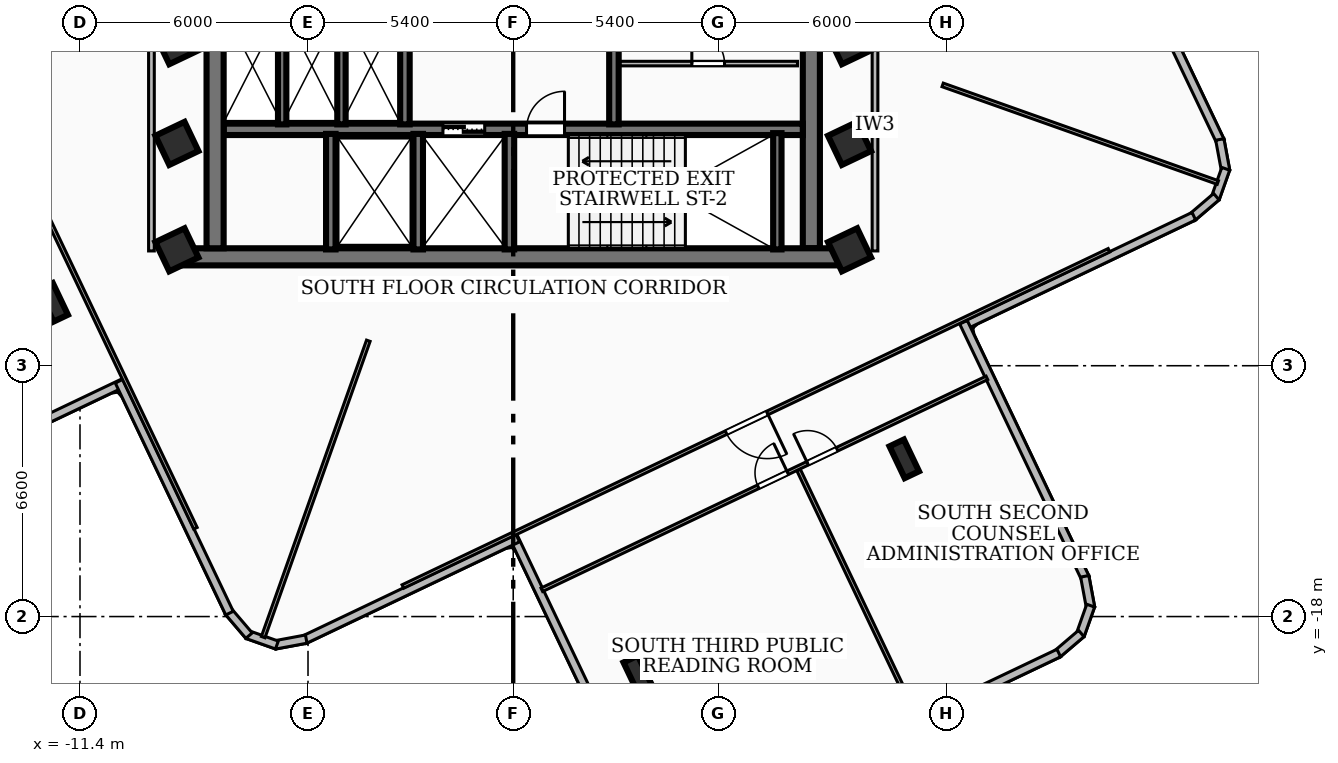
"""IFC4 building model, lengths in metres.
Left out: names, types, materials, properties, quantities, classifications, styles, units other than length and angle.
Written with IfcOpenShell. Run it as: python <this file> out.ifc"""

import sys

from ifc_helpers import new_model, si_unit, direction, frame, frame_2d, origin, origin_2d, place, context, subcontext, project, spatial, rectangle, i_section, extrude, element, fill, save


model = new_model("IFC4")
c1 = context("Model", 3, precision=1e-05, world=origin(), true_north=direction((0.0, 1.0)))
c2 = subcontext(c1, "Body", "Model", "MODEL_VIEW")
j1 = project(units=[si_unit("LENGTHUNIT", "METRE"), si_unit("PLANEANGLEUNIT", "RADIAN")], contexts=[c1])
p1 = place(None, origin())
s1 = spatial("IfcSite", under=j1, at=p1, CompositionType="ELEMENT")
p2 = place(p1, origin())
s2 = spatial("IfcBuilding", under=s1, at=p2, CompositionType="ELEMENT")
p3 = place(p2, frame((0.0, 0.0, 188.28)))
s3 = spatial("IfcBuildingStorey", under=s2, at=p3, CompositionType="ELEMENT", Elevation=188.28)
p4 = place(p3, frame((8.78, -8.535, 0.0), z_axis=(0.0, 0.0, 1.0), x_axis=(-1.0, 0.0, 0.0)))
e1 = element("IfcWall", 1, at=p4, inside=s3, PredefinedType="SHEAR", context=c2, shape_type="SweptSolid", body=[
    extrude(rectangle(XDim=17.56, YDim=0.45, at=frame_2d((8.78, 0.0))), origin(), (0.0, 0.0, 1.0), 4.06),
])
for number, where, z_axis, x_axis in (
    (2, (-7.845, -8.31, 0.0), (0.0, 0.0, 1.0), (0.0, 1.0, 0.0)),
    (3, (7.845, -1.975, 0.0), (0.0, 0.0, 1.0), (0.0, -1.0, 0.0)),
):
    element("IfcWall", number, at=place(p3, frame(where, z_axis=z_axis, x_axis=x_axis)), inside=s3, PredefinedType="SHEAR", context=c2, shape_type="SweptSolid", body=[
        extrude(rectangle(XDim=6.335, YDim=0.45, at=frame_2d((3.167, 0.0))), origin(), (0.0, 0.0, 1.0), 4.06),
    ])
p5 = place(p3, frame((-7.62, -5.18, 0.0), z_axis=(0.0, 0.0, 1.0), x_axis=(1.0, 0.0, 0.0)))
e4 = element("IfcWall", 4, at=p5, inside=s3, PredefinedType="SOLIDWALL", context=c2, shape_type="SweptSolid", body=[
    extrude(rectangle(XDim=15.24, YDim=0.3, at=frame_2d((7.62, 0.0))), origin(), (0.0, 0.0, 1.0), 4.06),
])
p6 = place(p5, frame((5.77, 0.0, 0.0)))
e5 = element("IfcOpeningElement", 5, at=p6, cuts=e4, PredefinedType="OPENING", context=c2, shape_type="SweptSolid", body=[
    extrude(rectangle(XDim=1.1, YDim=2.15, at=frame_2d((0.55, 1.075))), frame((0.0, 0.16, 0.0), z_axis=(0.0, -1.0, 0.0), x_axis=(1.0, 0.0, 0.0)), (0.0, 0.0, 1.0), 0.32),
])
p7 = place(p5, frame((7.97, 0.0, 0.0)))
e6 = element("IfcOpeningElement", 6, at=p7, cuts=e4, PredefinedType="OPENING", context=c2, shape_type="SweptSolid", body=[
    extrude(rectangle(XDim=1.0, YDim=2.1, at=frame_2d((0.5, 1.05))), frame((0.0, 0.16, 0.0), z_axis=(0.0, -1.0, 0.0), x_axis=(1.0, 0.0, 0.0)), (0.0, 0.0, 1.0), 0.32),
])
p8 = place(p3, frame((6.95, -8.34, 0.0), z_axis=(0.0, 0.0, 1.0), x_axis=(0.0, 1.0, 0.0)))
e7 = element("IfcWall", 7, at=p8, inside=s3, PredefinedType="SOLIDWALL", context=c2, shape_type="SweptSolid", body=[
    extrude(rectangle(XDim=3.06, YDim=0.22, at=frame_2d((1.53, 0.0))), origin(), (0.0, 0.0, 1.0), 4.06),
])
for number, where, z_axis, x_axis in (
    (8, (-0.1, -8.34, 0.0), (0.0, 0.0, 1.0), (0.0, 1.0, 0.0)),
    (9, (-2.5, -8.34, 0.0), (0.0, 0.0, 1.0), (0.0, 1.0, 0.0)),
    (10, (-4.8, -8.34, 0.0), (0.0, 0.0, 1.0), (0.0, 1.0, 0.0)),
):
    element("IfcWall", number, at=place(p3, frame(where, z_axis=z_axis, x_axis=x_axis)), inside=s3, PredefinedType="SOLIDWALL", context=c2, shape_type="SweptSolid", body=[
        extrude(rectangle(XDim=3.04, YDim=0.25, at=frame_2d((1.52, 0.0))), origin(), (0.0, 0.0, 1.0), 4.06),
    ])
for number, where, z_axis, x_axis in (
    (11, (-2.85, -5.05, 0.0), (0.0, 0.0, 1.0), (0.0, 1.0, 0.0)),
    (12, (2.65, -5.05, 0.0), (0.0, 0.0, 1.0), (0.0, 1.0, 0.0)),
):
    element("IfcWall", number, at=place(p3, frame(where, z_axis=z_axis, x_axis=x_axis)), inside=s3, PredefinedType="SOLIDWALL", context=c2, shape_type="SweptSolid", body=[
        extrude(rectangle(XDim=3.07, YDim=0.25, at=frame_2d((1.535, 0.0))), origin(), (0.0, 0.0, 1.0), 4.06),
    ])
for number, where, z_axis, x_axis in (
    (13, (-6.08, -5.05, 0.0), (0.0, 0.0, 1.0), (0.0, 1.0, 0.0)),
    (14, (-4.52, -5.05, 0.0), (0.0, 0.0, 1.0), (0.0, 1.0, 0.0)),
):
    element("IfcWall", number, at=place(p3, frame(where, z_axis=z_axis, x_axis=x_axis)), inside=s3, PredefinedType="SOLIDWALL", context=c2, shape_type="SweptSolid", body=[
        extrude(rectangle(XDim=3.07, YDim=0.22, at=frame_2d((1.535, 0.0))), origin(), (0.0, 0.0, 1.0), 4.06),
    ])
for number, where, z_axis, x_axis in (
    (15, (-8.85, -5.55, 0.0), (0.0, 0.0, 1.0), (0.903, 0.43, 0.0)),
    (16, (-8.85, -2.9, 0.0), (0.0, 0.0, 1.0), (0.903, 0.43, 0.0)),
    (17, (8.85, -5.55, 0.0), (0.0, 0.0, 1.0), (0.903, 0.43, 0.0)),
    (18, (8.85, -2.9, 0.0), (0.0, 0.0, 1.0), (0.903, 0.43, 0.0)),
    (19, (8.85, -8.35, 0.0), (0.0, 0.0, 1.0), (0.903, 0.43, 0.0)),
    (20, (-8.85, -8.35, 0.0), (0.0, 0.0, 1.0), (0.903, 0.43, 0.0)),
):
    element("IfcColumn", number, at=place(p3, frame(where, z_axis=z_axis, x_axis=x_axis)), inside=s3, PredefinedType="COLUMN", context=c2, shape_type="SweptSolid", body=[
        extrude(rectangle(XDim=0.85, YDim=0.85, at=origin_2d()), origin(), (0.0, 0.0, 1.0), 4.32),
    ])
for number, where, z_axis, x_axis in (
    (21, (-12.106, -9.731, 0.0), (0.0, 0.0, 1.0), (0.903, 0.43, 0.0)),
    (22, (3.29, -19.536, 0.0), (0.0, 0.0, 1.0), (0.903, 0.43, 0.0)),
    (23, (10.29, -13.85, 0.0), (0.0, 0.0, 1.0), (0.903, 0.43, 0.0)),
):
    element("IfcColumn", number, at=place(p3, frame(where, z_axis=z_axis, x_axis=x_axis)), inside=s3, PredefinedType="COLUMN", context=c2, shape_type="SweptSolid", body=[
        extrude(i_section(OverallWidth=0.418, OverallDepth=0.927, WebThickness=0.019, FlangeThickness=0.032, at=origin_2d()), origin(), (0.0, 0.0, 1.0), 4.32),
    ])
p9 = place(p3, frame((-10.255, -11.848, 0.0), z_axis=(0.0, 0.0, 1.0), x_axis=(-0.902833615009, -0.429990073851, 0.0)))
e24 = element("IfcWall", 24, at=p9, inside=s3, PredefinedType="SOLIDWALL", context=c2, shape_type="SweptSolid", body=[
    extrude(rectangle(XDim=9.058, YDim=0.22, at=frame_2d((4.529, 0.0))), origin(), (0.0, 0.0, 1.0), 4.06),
])
p10 = place(p9, frame((3.85, 0.0, 0.85)))
e25 = element("IfcOpeningElement", 25, at=p10, cuts=e24, PredefinedType="OPENING", context=c2, shape_type="SweptSolid", body=[
    extrude(rectangle(XDim=2.4, YDim=1.65, at=frame_2d((1.2, 0.825))), frame((0.0, 0.12, 0.0), z_axis=(0.0, -1.0, 0.0), x_axis=(1.0, 0.0, 0.0)), (0.0, 0.0, 1.0), 0.24),
])
p11 = place(p3, frame((15.935, 0.119, 0.0), z_axis=(0.0, 0.0, 1.0), x_axis=(0.429997588734, -0.902830035878, 0.0)))
e26 = element("IfcWall", 26, at=p11, inside=s3, PredefinedType="SOLIDWALL", context=c2, shape_type="SweptSolid", body=[
    extrude(rectangle(XDim=6.218, YDim=0.22, at=frame_2d((3.109, 0.0))), origin(), (0.0, 0.0, 1.0), 4.06),
])
p12 = place(p3, frame((18.593, -5.447, 0.0), z_axis=(0.0, 0.0, 1.0), x_axis=(0.183282428617, -0.983060298944, 0.0)))
e27 = element("IfcWall", 27, at=p12, inside=s3, PredefinedType="SOLIDWALL", context=c2, shape_type="SweptSolid", body=[
    extrude(rectangle(XDim=0.835, YDim=0.22, at=frame_2d((0.417, 0.0))), origin(), (0.0, 0.0, 1.0), 4.06),
])
p13 = place(p3, frame((18.749, -6.219, 0.0), z_axis=(0.0, 0.0, 1.0), x_axis=(-0.33403451258, -0.942560843875, 0.0)))
e28 = element("IfcWall", 28, at=p13, inside=s3, PredefinedType="SOLIDWALL", context=c2, shape_type="SweptSolid", body=[
    extrude(rectangle(XDim=0.82, YDim=0.22, at=frame_2d((0.41, 0.0))), origin(), (0.0, 0.0, 1.0), 4.06),
])
p14 = place(p3, frame((18.502, -6.952, 0.0), z_axis=(0.0, 0.0, 1.0), x_axis=(-0.76070207285, -0.649101191157, 0.0)))
e29 = element("IfcWall", 29, at=p14, inside=s3, PredefinedType="SOLIDWALL", context=c2, shape_type="SweptSolid", body=[
    extrude(rectangle(XDim=0.833, YDim=0.22, at=frame_2d((0.417, 0.0))), origin(), (0.0, 0.0, 1.0), 4.06),
])
p15 = place(p3, frame((17.91, -7.466, 0.0), z_axis=(0.0, 0.0, 1.0), x_axis=(-0.902871867899, -0.429909746524, 0.0)))
e30 = element("IfcWall", 30, at=p15, inside=s3, PredefinedType="SOLIDWALL", context=c2, shape_type="SweptSolid", body=[
    extrude(rectangle(XDim=6.76, YDim=0.22, at=frame_2d((3.38, 0.0))), origin(), (0.0, 0.0, 1.0), 4.06),
])
p16 = place(p3, frame((11.848, -10.255, 0.0), z_axis=(0.0, 0.0, 1.0), x_axis=(0.429966614546, -0.902844787533, 0.0)))
e31 = element("IfcWall", 31, at=p16, inside=s3, PredefinedType="SOLIDWALL", context=c2, shape_type="SweptSolid", body=[
    extrude(rectangle(XDim=7.459, YDim=0.22, at=frame_2d((3.729, 0.0))), origin(), (0.0, 0.0, 1.0), 4.06),
])
p17 = place(p3, frame((15.039, -16.941, 0.0), z_axis=(0.0, 0.0, 1.0), x_axis=(0.182999909077, -0.983112930074, 0.0)))
e32 = element("IfcWall", 32, at=p17, inside=s3, PredefinedType="SOLIDWALL", context=c2, shape_type="SweptSolid", body=[
    extrude(rectangle(XDim=0.835, YDim=0.22, at=frame_2d((0.417, 0.0))), origin(), (0.0, 0.0, 1.0), 4.06),
])
p18 = place(p3, frame((15.195, -17.713, 0.0), z_axis=(0.0, 0.0, 1.0), x_axis=(-0.33420520266, -0.942500335552, 0.0)))
e33 = element("IfcWall", 33, at=p18, inside=s3, PredefinedType="SOLIDWALL", context=c2, shape_type="SweptSolid", body=[
    extrude(rectangle(XDim=0.82, YDim=0.22, at=frame_2d((0.41, 0.0))), origin(), (0.0, 0.0, 1.0), 4.06),
])
p19 = place(p3, frame((14.948, -18.446, 0.0), z_axis=(0.0, 0.0, 1.0), x_axis=(-0.76070207285, -0.649101191157, 0.0)))
e34 = element("IfcWall", 34, at=p19, inside=s3, PredefinedType="SOLIDWALL", context=c2, shape_type="SweptSolid", body=[
    extrude(rectangle(XDim=0.833, YDim=0.22, at=frame_2d((0.417, 0.0))), origin(), (0.0, 0.0, 1.0), 4.06),
])
p20 = place(p3, frame((14.356, -18.96, 0.0), z_axis=(0.0, 0.0, 1.0), x_axis=(-0.902857854372, -0.429939175696, 0.0)))
e35 = element("IfcWall", 35, at=p20, inside=s3, PredefinedType="SOLIDWALL", context=c2, shape_type="SweptSolid", body=[
    extrude(rectangle(XDim=10.162, YDim=0.22, at=frame_2d((5.081, 0.0))), origin(), (0.0, 0.0, 1.0), 4.06),
])
p21 = place(p20, frame((7.026, 0.0, 0.85)))
e36 = element("IfcOpeningElement", 36, at=p21, cuts=e35, PredefinedType="OPENING", context=c2, shape_type="SweptSolid", body=[
    extrude(rectangle(XDim=1.8, YDim=1.6, at=frame_2d((0.9, 0.8))), frame((0.0, 0.12, 0.0), z_axis=(0.0, -1.0, 0.0), x_axis=(1.0, 0.0, 0.0)), (0.0, 0.0, 1.0), 0.24),
])
p22 = place(p3, frame((3.209, -22.629, 0.0), z_axis=(0.0, 0.0, 1.0), x_axis=(-0.429928498614, 0.902862938701, 0.0)))
e37 = element("IfcWall", 37, at=p22, inside=s3, PredefinedType="SOLIDWALL", context=c2, shape_type="SweptSolid", body=[
    extrude(rectangle(XDim=7.459, YDim=0.22, at=frame_2d((3.73, 0.0))), origin(), (0.0, 0.0, 1.0), 4.06),
])
p23 = place(p3, frame((0.119, -15.935, 0.0), z_axis=(0.0, 0.0, 1.0), x_axis=(-0.902830035878, -0.429997588734, 0.0)))
e38 = element("IfcWall", 38, at=p23, inside=s3, PredefinedType="SOLIDWALL", context=c2, shape_type="SweptSolid", body=[
    extrude(rectangle(XDim=6.218, YDim=0.22, at=frame_2d((3.109, 0.0))), origin(), (0.0, 0.0, 1.0), 4.06),
])
p24 = place(p3, frame((-5.447, -18.593, 0.0), z_axis=(0.0, 0.0, 1.0), x_axis=(-0.983060298944, -0.183282428617, 0.0)))
e39 = element("IfcWall", 39, at=p24, inside=s3, PredefinedType="SOLIDWALL", context=c2, shape_type="SweptSolid", body=[
    extrude(rectangle(XDim=0.835, YDim=0.22, at=frame_2d((0.417, 0.0))), origin(), (0.0, 0.0, 1.0), 4.06),
])
p25 = place(p3, frame((-6.219, -18.749, 0.0), z_axis=(0.0, 0.0, 1.0), x_axis=(-0.942560843875, 0.33403451258, 0.0)))
e40 = element("IfcWall", 40, at=p25, inside=s3, PredefinedType="SOLIDWALL", context=c2, shape_type="SweptSolid", body=[
    extrude(rectangle(XDim=0.82, YDim=0.22, at=frame_2d((0.41, 0.0))), origin(), (0.0, 0.0, 1.0), 4.06),
])
p26 = place(p3, frame((-6.952, -18.502, 0.0), z_axis=(0.0, 0.0, 1.0), x_axis=(-0.649101191157, 0.76070207285, 0.0)))
e41 = element("IfcWall", 41, at=p26, inside=s3, PredefinedType="SOLIDWALL", context=c2, shape_type="SweptSolid", body=[
    extrude(rectangle(XDim=0.833, YDim=0.22, at=frame_2d((0.417, 0.0))), origin(), (0.0, 0.0, 1.0), 4.06),
])
p27 = place(p3, frame((-7.466, -17.91, 0.0), z_axis=(0.0, 0.0, 1.0), x_axis=(-0.429909746524, 0.902871867899, 0.0)))
e42 = element("IfcWall", 42, at=p27, inside=s3, PredefinedType="SOLIDWALL", context=c2, shape_type="SweptSolid", body=[
    extrude(rectangle(XDim=6.76, YDim=0.22, at=frame_2d((3.38, 0.0))), origin(), (0.0, 0.0, 1.0), 4.06),
])
p28 = place(p3, frame((2.8, -3.45, 0.0), z_axis=(0.0, 0.0, 1.0), x_axis=(1.0, 0.0, 0.0)))
e43 = element("IfcWall", 43, at=p28, inside=s3, PredefinedType="PARTITIONING", context=c2, shape_type="SweptSolid", body=[
    extrude(rectangle(XDim=4.68, YDim=0.12, at=frame_2d((2.34, 0.0))), origin(), (0.0, 0.0, 1.0), 4.06),
])
p29 = place(p28, frame((1.9, 0.0, 0.0)))
e44 = element("IfcOpeningElement", 44, at=p29, cuts=e43, PredefinedType="OPENING", context=c2, shape_type="SweptSolid", body=[
    extrude(rectangle(XDim=0.86, YDim=2.04, at=frame_2d((0.43, 1.02))), frame((0.0, 0.07, 0.0), z_axis=(0.0, -1.0, 0.0), x_axis=(1.0, 0.0, 0.0)), (0.0, 0.0, 1.0), 0.14),
])
p30 = place(p3, frame((-9.52, -8.38, 0.0), z_axis=(0.0, 0.0, 1.0), x_axis=(0.0, 1.0, 0.0)))
e45 = element("IfcWall", 45, at=p30, inside=s3, PredefinedType="PARTITIONING", context=c2, shape_type="SweptSolid", body=[
    extrude(rectangle(XDim=6.63, YDim=0.15, at=frame_2d((3.315, 0.0))), origin(), (0.0, 0.0, 1.0), 3.364),
])
p31 = place(p3, frame((9.52, -8.38, 0.0), z_axis=(0.0, 0.0, 1.0), x_axis=(0.0, 1.0, 0.0)))
e46 = element("IfcWall", 46, at=p31, inside=s3, PredefinedType="PARTITIONING", context=c2, shape_type="SweptSolid", body=[
    extrude(rectangle(XDim=6.63, YDim=0.15, at=frame_2d((3.315, 0.0))), origin(), (0.0, 0.0, 1.0), 4.06),
])
p32 = place(p3, frame((-3.813, -10.743, 0.0), z_axis=(0.0, 0.0, 1.0), x_axis=(-0.334412381202, -0.942426845595, 0.0)))
e47 = element("IfcWall", 47, at=p32, inside=s3, PredefinedType="PARTITIONING", context=c2, shape_type="SweptSolid", body=[
    extrude(rectangle(XDim=8.274, YDim=0.1, at=frame_2d((4.137, 0.0))), origin(), (0.0, 0.0, 1.0), 4.06),
])
p33 = place(p3, frame((11.3, -4.011, 0.0), z_axis=(0.0, 0.0, 1.0), x_axis=(0.942439374513, -0.334377070636, 0.0)))
e48 = element("IfcWall", 48, at=p33, inside=s3, PredefinedType="PARTITIONING", context=c2, shape_type="SweptSolid", body=[
    extrude(rectangle(XDim=7.683, YDim=0.1, at=frame_2d((3.842, 0.0))), origin(), (0.0, 0.0, 1.0), 4.06),
])
p34 = place(p3, frame((-8.362, -15.677, 0.0), z_axis=(0.0, 0.0, 1.0), x_axis=(-0.429924831179, 0.902864685064, 0.0)))
e49 = element("IfcWall", 49, at=p34, inside=s3, PredefinedType="PARTITIONING", context=c2, shape_type="SweptSolid", body=[
    extrude(rectangle(XDim=20.58, YDim=0.1, at=frame_2d((10.29, 0.0))), origin(), (0.0, 0.0, 1.0), 3.364),
])
p35 = place(p34, frame((9.96, 0.0, 0.0)))
e50 = element("IfcOpeningElement", 50, at=p35, cuts=e49, PredefinedType="OPENING", context=c2, shape_type="SweptSolid", body=[
    extrude(rectangle(XDim=1.2, YDim=2.1, at=frame_2d((0.6, 1.05))), frame((0.0, 0.06, 0.0), z_axis=(0.0, -1.0, 0.0), x_axis=(1.0, 0.0, 0.0)), (0.0, 0.0, 1.0), 0.12),
])
p36 = place(p3, frame((15.677, -8.362, 0.0), z_axis=(0.0, 0.0, 1.0), x_axis=(-0.902864685064, -0.429924831179, 0.0)))
e51 = element("IfcWall", 51, at=p36, inside=s3, PredefinedType="PARTITIONING", context=c2, shape_type="SweptSolid", body=[
    extrude(rectangle(XDim=20.58, YDim=0.1, at=frame_2d((10.29, 0.0))), origin(), (0.0, 0.0, 1.0), 3.364),
])
p37 = place(p36, frame((9.96, 0.0, 0.0)))
e52 = element("IfcOpeningElement", 52, at=p37, cuts=e51, PredefinedType="OPENING", context=c2, shape_type="SweptSolid", body=[
    extrude(rectangle(XDim=1.2, YDim=2.1, at=frame_2d((0.6, 1.05))), frame((0.0, 0.06, 0.0), z_axis=(0.0, -1.0, 0.0), x_axis=(1.0, 0.0, 0.0)), (0.0, 0.0, 1.0), 0.12),
])
p38 = place(p3, frame((7.51, -14.145, 0.0), z_axis=(0.0, 0.0, 1.0), x_axis=(0.429902059569, -0.902875528065, 0.0)))
e53 = element("IfcWall", 53, at=p38, inside=s3, PredefinedType="PARTITIONING", context=c2, shape_type="SweptSolid", body=[
    extrude(rectangle(XDim=7.216, YDim=0.1, at=frame_2d((3.608, 0.0))), origin(), (0.0, 0.0, 1.0), 4.06),
])
p39 = place(p3, frame((0.753, -17.296, 0.0), z_axis=(0.0, 0.0, 1.0), x_axis=(0.902885219382, 0.429881705382, 0.0)))
e54 = element("IfcWall", 54, at=p39, inside=s3, PredefinedType="PARTITIONING", context=c2, shape_type="SweptSolid", body=[
    extrude(rectangle(XDim=12.971, YDim=0.1, at=frame_2d((6.485, 0.0))), origin(), (0.0, 0.0, 1.0), 3.364),
])
p40 = place(p39, frame((6.305, 0.0, 0.0)))
e55 = element("IfcOpeningElement", 55, at=p40, cuts=e54, PredefinedType="OPENING", context=c2, shape_type="SweptSolid", body=[
    extrude(rectangle(XDim=0.86, YDim=2.04, at=frame_2d((0.43, 1.02))), frame((0.0, 0.06, 0.0), z_axis=(0.0, -1.0, 0.0), x_axis=(1.0, 0.0, 0.0)), (0.0, 0.0, 1.0), 0.12),
])
p41 = place(p39, frame((7.744, 0.0, 0.0)))
e56 = element("IfcOpeningElement", 56, at=p41, cuts=e54, PredefinedType="OPENING", context=c2, shape_type="SweptSolid", body=[
    extrude(rectangle(XDim=0.86, YDim=2.04, at=frame_2d((0.43, 1.02))), frame((0.0, 0.06, 0.0), z_axis=(0.0, -1.0, 0.0), x_axis=(1.0, 0.0, 0.0)), (0.0, 0.0, 1.0), 0.12),
])
p42 = place(p6, origin())
e57 = element("IfcDoor", 57, at=p42, inside=s3, OperationType="DOUBLE_DOOR_SLIDING", PredefinedType="DOOR", context=c2, shape_type="SweptSolid", body=[
    extrude(rectangle(XDim=1.1, YDim=2.15, at=frame_2d((0.55, 1.075))), frame((0.0, 0.025, 0.0), z_axis=(0.0, -1.0, 0.0), x_axis=(1.0, 0.0, 0.0)), (0.0, 0.0, 1.0), 0.05),
])
fill(e5, e57)
p43 = place(p7, origin())
e58 = element("IfcDoor", 58, at=p43, inside=s3, OperationType="SINGLE_SWING_RIGHT", PredefinedType="DOOR", context=c2, shape_type="SweptSolid", body=[
    extrude(rectangle(XDim=1.0, YDim=2.1, at=frame_2d((0.5, 1.05))), frame((0.0, 0.025, 0.0), z_axis=(0.0, -1.0, 0.0), x_axis=(1.0, 0.0, 0.0)), (0.0, 0.0, 1.0), 0.05),
])
fill(e6, e58)
p44 = place(p29, origin())
e59 = element("IfcDoor", 59, at=p44, inside=s3, OperationType="SINGLE_SWING_LEFT", PredefinedType="DOOR", context=c2, shape_type="SweptSolid", body=[
    extrude(rectangle(XDim=0.86, YDim=2.04, at=frame_2d((0.43, 1.02))), frame((0.0, 0.025, 0.0), z_axis=(0.0, -1.0, 0.0), x_axis=(1.0, 0.0, 0.0)), (0.0, 0.0, 1.0), 0.05),
])
fill(e44, e59)
p45 = place(p37, origin())
e60 = element("IfcDoor", 60, at=p45, inside=s3, OperationType="SINGLE_SWING_LEFT", PredefinedType="DOOR", context=c2, shape_type="SweptSolid", body=[
    extrude(rectangle(XDim=1.2, YDim=2.1, at=frame_2d((0.6, 1.05))), frame((0.0, 0.025, 0.0), z_axis=(0.0, -1.0, 0.0), x_axis=(1.0, 0.0, 0.0)), (0.0, 0.0, 1.0), 0.05),
])
fill(e52, e60)
p46 = place(p40, origin())
e61 = element("IfcDoor", 61, at=p46, inside=s3, OperationType="SINGLE_SWING_RIGHT", PredefinedType="DOOR", context=c2, shape_type="SweptSolid", body=[
    extrude(rectangle(XDim=0.86, YDim=2.04, at=frame_2d((0.43, 1.02))), frame((0.0, 0.025, 0.0), z_axis=(0.0, -1.0, 0.0), x_axis=(1.0, 0.0, 0.0)), (0.0, 0.0, 1.0), 0.05),
])
fill(e55, e61)
p47 = place(p41, origin())
e62 = element("IfcDoor", 62, at=p47, inside=s3, OperationType="SINGLE_SWING_LEFT", PredefinedType="DOOR", context=c2, shape_type="SweptSolid", body=[
    extrude(rectangle(XDim=0.86, YDim=2.04, at=frame_2d((0.43, 1.02))), frame((0.0, 0.025, 0.0), z_axis=(0.0, -1.0, 0.0), x_axis=(1.0, 0.0, 0.0)), (0.0, 0.0, 1.0), 0.05),
])
fill(e56, e62)
save(model, sys.argv[1])
